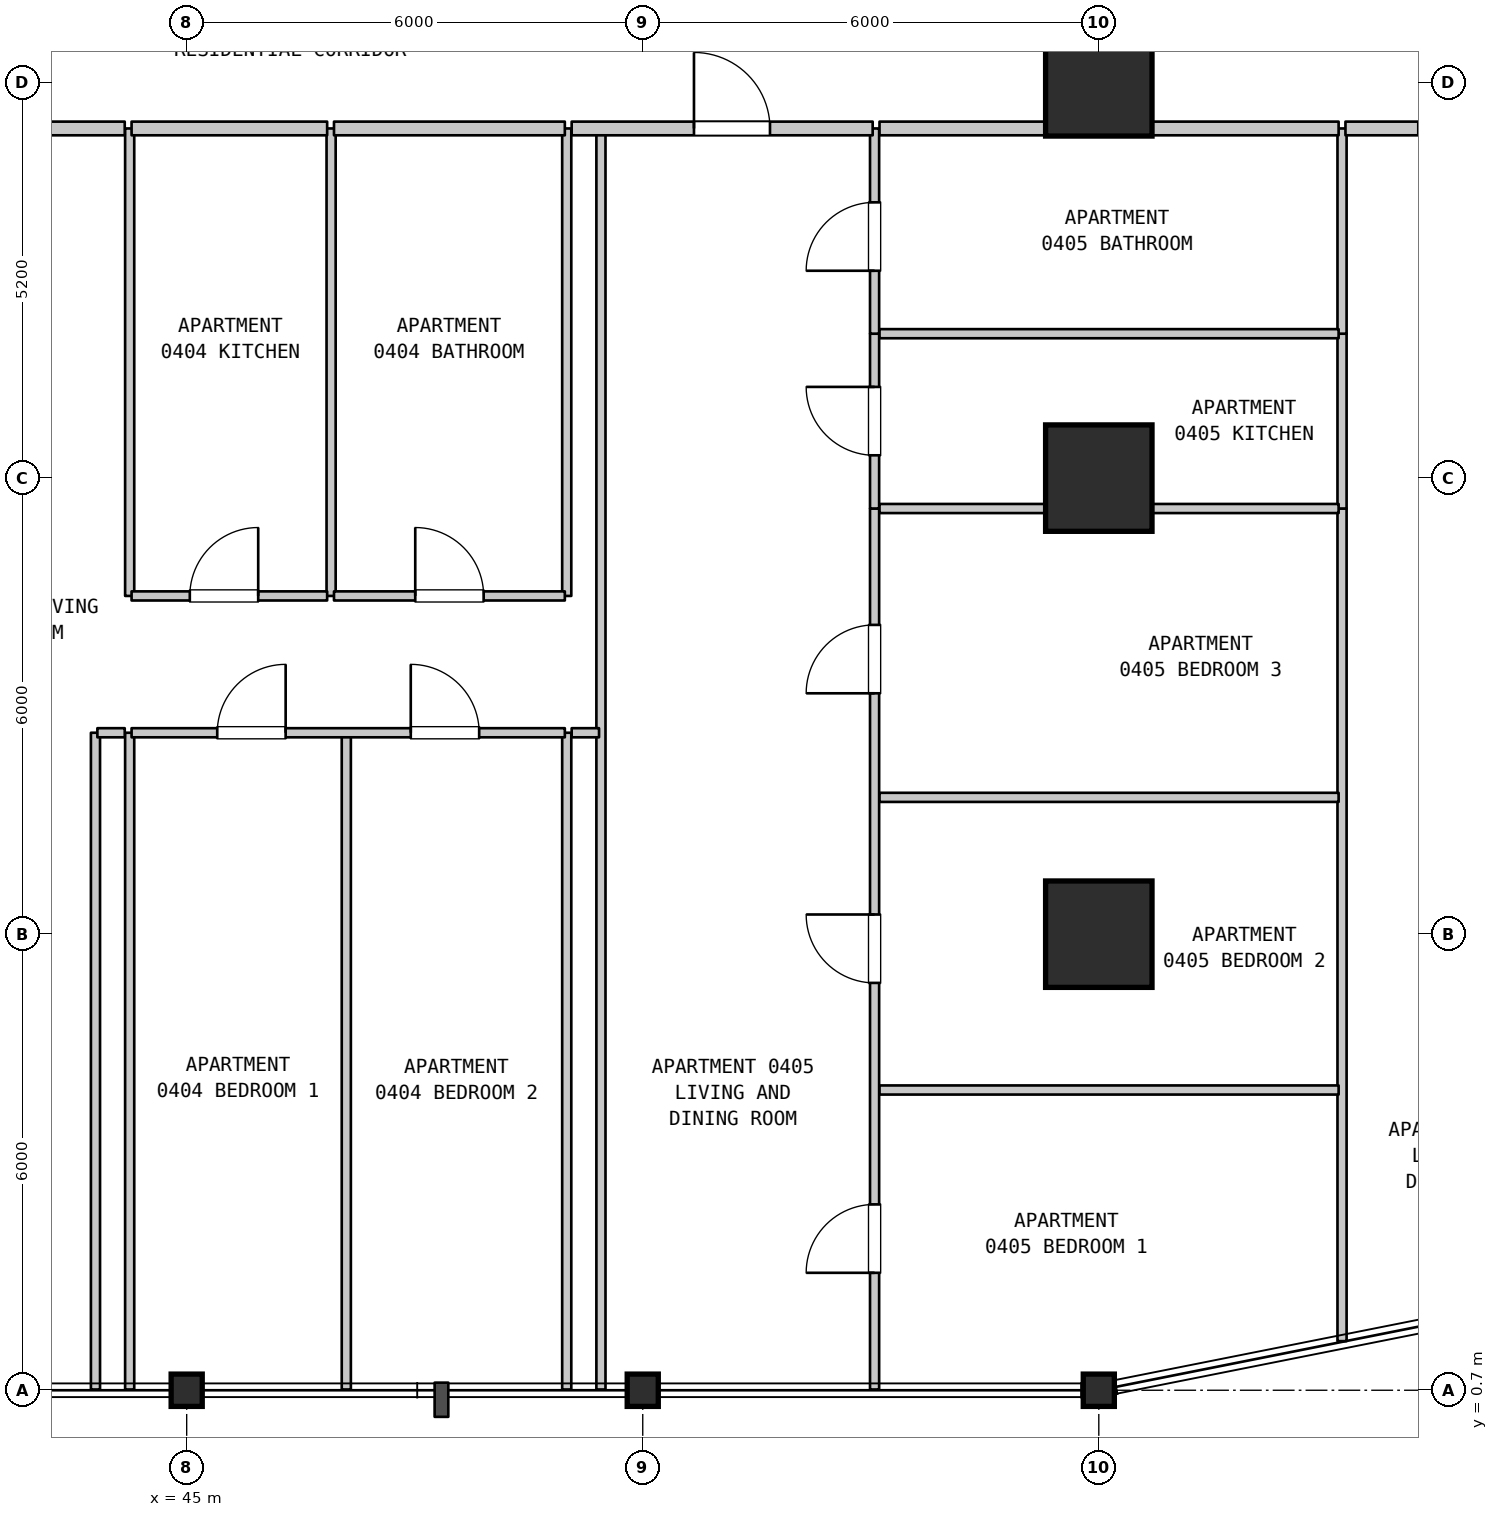
"""IFC4 building model, lengths in metres.
Left out: names, types, materials, properties, quantities, classifications, styles, units other than length and angle.
Written with IfcOpenShell. Run it as: python <this file> out.ifc"""

import sys

from ifc_helpers import new_model, si_unit, direction, frame, frame_2d, origin, origin_2d, place, context, subcontext, project, spatial, rectangle, i_section, extrude, element, fill, save


model = new_model("IFC4")
c1 = context("Model", 3, precision=1e-05, world=origin(), true_north=direction((0.0, 1.0)))
c2 = subcontext(c1, "Body", "Model", "MODEL_VIEW")
j1 = project(units=[si_unit("LENGTHUNIT", "METRE"), si_unit("PLANEANGLEUNIT", "RADIAN")], contexts=[c1])
p1 = place(None, origin())
s1 = spatial("IfcSite", under=j1, at=p1, CompositionType="ELEMENT")
p2 = place(p1, origin())
s2 = spatial("IfcBuilding", under=s1, at=p2, CompositionType="ELEMENT")
p3 = place(p2, frame((0.0, 0.0, 24.0)))
s3 = spatial("IfcBuildingStorey", under=s2, at=p3, CompositionType="ELEMENT", Elevation=24.0)
for number, where, z_axis, x_axis in (
    (1, (45.0, 0.7, 0.0), (0.0, 0.0, 1.0), (1.0, 0.0, 0.0)),
    (2, (51.0, 0.7, 0.0), (0.0, 0.0, 1.0), (1.0, 0.0, 0.0)),
    (3, (57.0, 0.7, 0.0), (0.0, 0.0, 1.0), (1.0, 0.0, 0.0)),
):
    element("IfcColumn", number, at=place(p3, frame(where, z_axis=z_axis, x_axis=x_axis)), inside=s3, PredefinedType="COLUMN", context=c2, shape_type="SweptSolid", body=[
        extrude(i_section(OverallWidth=0.409, OverallDepth=0.425, WebThickness=0.032, FlangeThickness=0.052, FilletRadius=0.015, at=origin_2d()), origin(), (0.0, 0.0, 1.0), 3.7),
    ])
for number, where, z_axis, x_axis in (
    (4, (57.0, 6.7, 0.0), (0.0, 0.0, 1.0), (1.0, 0.0, 0.0)),
    (5, (57.0, 12.7, 0.0), (0.0, 0.0, 1.0), (1.0, 0.0, 0.0)),
    (6, (57.0, 17.9, 0.0), (0.0, 0.0, 1.0), (1.0, 0.0, 0.0)),
):
    element("IfcColumn", number, at=place(p3, frame(where, z_axis=z_axis, x_axis=x_axis)), inside=s3, PredefinedType="COLUMN", context=c2, shape_type="SweptSolid", body=[
        extrude(rectangle(XDim=1.4, YDim=1.4, at=origin_2d()), origin(), (0.0, 0.0, 1.0), 3.7),
    ])
for number, where, z_axis, x_axis in (
    (7, (43.8, 0.71, 0.0), (0.0, 0.0, 1.0), (0.0, 1.0, 0.0)),
    (8, (44.25, 0.71, 0.0), (0.0, 0.0, 1.0), (0.0, 1.0, 0.0)),
):
    element("IfcWall", number, at=place(p3, frame(where, z_axis=z_axis, x_axis=x_axis)), inside=s3, PredefinedType="PARTITIONING", context=c2, shape_type="SweptSolid", body=[
        extrude(rectangle(XDim=8.64, YDim=0.12, at=frame_2d((4.32, 0.0))), origin(), (0.0, 0.0, 1.0), 3.385),
    ])
for number, where, z_axis, x_axis in (
    (9, (44.25, 11.15, 0.0), (0.0, 0.0, 1.0), (0.0, 1.0, 0.0)),
    (10, (46.9, 11.15, 0.0), (0.0, 0.0, 1.0), (0.0, 1.0, 0.0)),
):
    element("IfcWall", number, at=place(p3, frame(where, z_axis=z_axis, x_axis=x_axis)), inside=s3, PredefinedType="PARTITIONING", context=c2, shape_type="SweptSolid", body=[
        extrude(rectangle(XDim=6.15, YDim=0.12, at=frame_2d((3.075, 0.0))), origin(), (0.0, 0.0, 1.0), 3.385),
    ])
for number, where, z_axis, x_axis in (
    (11, (47.1, 0.71, 0.0), (0.0, 0.0, 1.0), (0.0, 1.0, 0.0)),
    (12, (50.0, 0.71, 0.0), (0.0, 0.0, 1.0), (0.0, 1.0, 0.0)),
):
    element("IfcWall", number, at=place(p3, frame(where, z_axis=z_axis, x_axis=x_axis)), inside=s3, PredefinedType="PARTITIONING", context=c2, shape_type="SweptSolid", body=[
        extrude(rectangle(XDim=8.64, YDim=0.12, at=frame_2d((4.32, 0.0))), origin(), (0.0, 0.0, 1.0), 3.385),
    ])
p4 = place(p3, frame((50.0, 11.15, 0.0), z_axis=(0.0, 0.0, 1.0), x_axis=(0.0, 1.0, 0.0)))
e13 = element("IfcWall", 13, at=p4, inside=s3, PredefinedType="PARTITIONING", context=c2, shape_type="SweptSolid", body=[
    extrude(rectangle(XDim=6.15, YDim=0.12, at=frame_2d((3.075, 0.0))), origin(), (0.0, 0.0, 1.0), 3.385),
])
p5 = place(p3, frame((50.45, 0.71, 0.0), z_axis=(0.0, 0.0, 1.0), x_axis=(0.0, 1.0, 0.0)))
e14 = element("IfcWall", 14, at=p5, inside=s3, PredefinedType="PARTITIONING", context=c2, shape_type="SweptSolid", body=[
    extrude(rectangle(XDim=16.59, YDim=0.12, at=frame_2d((8.295, 0.0))), origin(), (0.0, 0.0, 1.0), 3.385),
])
p6 = place(p3, frame((54.05, 0.71, 0.0), z_axis=(0.0, 0.0, 1.0), x_axis=(0.0, 1.0, 0.0)))
e15 = element("IfcWall", 15, at=p6, inside=s3, PredefinedType="PARTITIONING", context=c2, shape_type="SweptSolid", body=[
    extrude(rectangle(XDim=11.59, YDim=0.12, at=frame_2d((5.795, 0.0))), origin(), (0.0, 0.0, 1.0), 3.385),
])
p7 = place(p6, frame((1.535, 0.0, 0.0)))
e16 = element("IfcOpeningElement", 16, at=p7, cuts=e15, PredefinedType="OPENING", context=c2, shape_type="SweptSolid", body=[
    extrude(rectangle(XDim=0.9, YDim=2.15, at=frame_2d((0.45, 1.075))), frame((0.0, 0.07, 0.0), z_axis=(0.0, -1.0, 0.0), x_axis=(1.0, 0.0, 0.0)), (0.0, 0.0, 1.0), 0.14),
])
p8 = place(p6, frame((5.349, 0.0, 0.0)))
e17 = element("IfcOpeningElement", 17, at=p8, cuts=e15, PredefinedType="OPENING", context=c2, shape_type="SweptSolid", body=[
    extrude(rectangle(XDim=0.9, YDim=2.15, at=frame_2d((0.45, 1.075))), frame((0.0, 0.07, 0.0), z_axis=(0.0, -1.0, 0.0), x_axis=(1.0, 0.0, 0.0)), (0.0, 0.0, 1.0), 0.14),
])
p9 = place(p6, frame((9.159, 0.0, 0.0)))
e18 = element("IfcOpeningElement", 18, at=p9, cuts=e15, PredefinedType="OPENING", context=c2, shape_type="SweptSolid", body=[
    extrude(rectangle(XDim=0.9, YDim=2.15, at=frame_2d((0.45, 1.075))), frame((0.0, 0.07, 0.0), z_axis=(0.0, -1.0, 0.0), x_axis=(1.0, 0.0, 0.0)), (0.0, 0.0, 1.0), 0.14),
])
p10 = place(p3, frame((54.05, 12.3, 0.0), z_axis=(0.0, 0.0, 1.0), x_axis=(0.0, 1.0, 0.0)))
e19 = element("IfcWall", 19, at=p10, inside=s3, PredefinedType="PARTITIONING", context=c2, shape_type="SweptSolid", body=[
    extrude(rectangle(XDim=2.3, YDim=0.12, at=frame_2d((1.15, 0.0))), origin(), (0.0, 0.0, 1.0), 3.385),
])
p11 = place(p10, frame((0.7, 0.0, 0.0)))
e20 = element("IfcOpeningElement", 20, at=p11, cuts=e19, PredefinedType="OPENING", context=c2, shape_type="SweptSolid", body=[
    extrude(rectangle(XDim=0.9, YDim=2.15, at=frame_2d((0.45, 1.075))), frame((0.0, 0.07, 0.0), z_axis=(0.0, -1.0, 0.0), x_axis=(1.0, 0.0, 0.0)), (0.0, 0.0, 1.0), 0.14),
])
p12 = place(p3, frame((54.05, 14.6, 0.0), z_axis=(0.0, 0.0, 1.0), x_axis=(0.0, 1.0, 0.0)))
e21 = element("IfcWall", 21, at=p12, inside=s3, PredefinedType="PARTITIONING", context=c2, shape_type="SweptSolid", body=[
    extrude(rectangle(XDim=2.7, YDim=0.12, at=frame_2d((1.35, 0.0))), origin(), (0.0, 0.0, 1.0), 3.385),
])
p13 = place(p12, frame((0.828, 0.0, 0.0)))
e22 = element("IfcOpeningElement", 22, at=p13, cuts=e21, PredefinedType="OPENING", context=c2, shape_type="SweptSolid", body=[
    extrude(rectangle(XDim=0.9, YDim=2.1, at=frame_2d((0.45, 1.05))), frame((0.0, 0.07, 0.0), z_axis=(0.0, -1.0, 0.0), x_axis=(1.0, 0.0, 0.0)), (0.0, 0.0, 1.0), 0.14),
])
p14 = place(p3, frame((60.2, 1.346, 0.0), z_axis=(0.0, 0.0, 1.0), x_axis=(0.0, 1.0, 0.0)))
e23 = element("IfcWall", 23, at=p14, inside=s3, PredefinedType="PARTITIONING", context=c2, shape_type="SweptSolid", body=[
    extrude(rectangle(XDim=10.954, YDim=0.12, at=frame_2d((5.477, 0.0))), origin(), (0.0, 0.0, 1.0), 3.385),
])
p15 = place(p3, frame((60.2, 12.3, 0.0), z_axis=(0.0, 0.0, 1.0), x_axis=(0.0, 1.0, 0.0)))
e24 = element("IfcWall", 24, at=p15, inside=s3, PredefinedType="PARTITIONING", context=c2, shape_type="SweptSolid", body=[
    extrude(rectangle(XDim=2.3, YDim=0.12, at=frame_2d((1.15, 0.0))), origin(), (0.0, 0.0, 1.0), 3.385),
])
p16 = place(p3, frame((60.2, 14.6, 0.0), z_axis=(0.0, 0.0, 1.0), x_axis=(0.0, 1.0, 0.0)))
e25 = element("IfcWall", 25, at=p16, inside=s3, PredefinedType="PARTITIONING", context=c2, shape_type="SweptSolid", body=[
    extrude(rectangle(XDim=2.7, YDim=0.12, at=frame_2d((1.35, 0.0))), origin(), (0.0, 0.0, 1.0), 3.385),
])
for number, where, z_axis, x_axis in (
    (26, (54.115, 4.65, 0.0), (0.0, 0.0, 1.0), (1.0, 0.0, 0.0)),
    (27, (54.115, 8.5, 0.0), (0.0, 0.0, 1.0), (1.0, 0.0, 0.0)),
):
    element("IfcWall", number, at=place(p3, frame(where, z_axis=z_axis, x_axis=x_axis)), inside=s3, PredefinedType="PARTITIONING", context=c2, shape_type="SweptSolid", body=[
        extrude(rectangle(XDim=6.04, YDim=0.12, at=frame_2d((3.02, 0.0))), origin(), (0.0, 0.0, 1.0), 3.385),
    ])
p17 = place(p3, frame((43.825, 9.35, 0.0), z_axis=(0.0, 0.0, 1.0), x_axis=(1.0, 0.0, 0.0)))
e28 = element("IfcWall", 28, at=p17, inside=s3, PredefinedType="PARTITIONING", context=c2, shape_type="SweptSolid", body=[
    extrude(rectangle(XDim=0.36, YDim=0.12, at=frame_2d((0.18, 0.0))), origin(), (0.0, 0.0, 1.0), 3.385),
])
p18 = place(p3, frame((44.275, 9.35, 0.0), z_axis=(0.0, 0.0, 1.0), x_axis=(1.0, 0.0, 0.0)))
e29 = element("IfcWall", 29, at=p18, inside=s3, PredefinedType="PARTITIONING", context=c2, shape_type="SweptSolid", body=[
    extrude(rectangle(XDim=5.7, YDim=0.12, at=frame_2d((2.85, 0.0))), origin(), (0.0, 0.0, 1.0), 3.385),
])
p19 = place(p18, frame((1.127, 0.0, 0.0)))
e30 = element("IfcOpeningElement", 30, at=p19, cuts=e29, PredefinedType="OPENING", context=c2, shape_type="SweptSolid", body=[
    extrude(rectangle(XDim=0.9, YDim=2.15, at=frame_2d((0.45, 1.075))), frame((0.0, 0.07, 0.0), z_axis=(0.0, -1.0, 0.0), x_axis=(1.0, 0.0, 0.0)), (0.0, 0.0, 1.0), 0.14),
])
p20 = place(p18, frame((3.673, 0.0, 0.0)))
e31 = element("IfcOpeningElement", 31, at=p20, cuts=e29, PredefinedType="OPENING", context=c2, shape_type="SweptSolid", body=[
    extrude(rectangle(XDim=0.9, YDim=2.15, at=frame_2d((0.45, 1.075))), frame((0.0, 0.07, 0.0), z_axis=(0.0, -1.0, 0.0), x_axis=(1.0, 0.0, 0.0)), (0.0, 0.0, 1.0), 0.14),
])
p21 = place(p3, frame((50.065, 9.35, 0.0), z_axis=(0.0, 0.0, 1.0), x_axis=(1.0, 0.0, 0.0)))
e32 = element("IfcWall", 32, at=p21, inside=s3, PredefinedType="PARTITIONING", context=c2, shape_type="SweptSolid", body=[
    extrude(rectangle(XDim=0.36, YDim=0.12, at=frame_2d((0.18, 0.0))), origin(), (0.0, 0.0, 1.0), 3.385),
])
p22 = place(p3, frame((44.275, 11.15, 0.0), z_axis=(0.0, 0.0, 1.0), x_axis=(1.0, 0.0, 0.0)))
e33 = element("IfcWall", 33, at=p22, inside=s3, PredefinedType="PARTITIONING", context=c2, shape_type="SweptSolid", body=[
    extrude(rectangle(XDim=2.573, YDim=0.12, at=frame_2d((1.287, 0.0))), origin(), (0.0, 0.0, 1.0), 3.385),
])
p23 = place(p22, frame((0.766, 0.0, 0.0)))
e34 = element("IfcOpeningElement", 34, at=p23, cuts=e33, PredefinedType="OPENING", context=c2, shape_type="SweptSolid", body=[
    extrude(rectangle(XDim=0.9, YDim=2.15, at=frame_2d((0.45, 1.075))), frame((0.0, 0.07, 0.0), z_axis=(0.0, -1.0, 0.0), x_axis=(1.0, 0.0, 0.0)), (0.0, 0.0, 1.0), 0.14),
])
p24 = place(p3, frame((46.938, 11.15, 0.0), z_axis=(0.0, 0.0, 1.0), x_axis=(1.0, 0.0, 0.0)))
e35 = element("IfcWall", 35, at=p24, inside=s3, PredefinedType="PARTITIONING", context=c2, shape_type="SweptSolid", body=[
    extrude(rectangle(XDim=3.037, YDim=0.12, at=frame_2d((1.519, 0.0))), origin(), (0.0, 0.0, 1.0), 3.385),
])
p25 = place(p24, frame((1.069, 0.0, 0.0)))
e36 = element("IfcOpeningElement", 36, at=p25, cuts=e35, PredefinedType="OPENING", context=c2, shape_type="SweptSolid", body=[
    extrude(rectangle(XDim=0.9, YDim=2.1, at=frame_2d((0.45, 1.05))), frame((0.0, 0.07, 0.0), z_axis=(0.0, -1.0, 0.0), x_axis=(1.0, 0.0, 0.0)), (0.0, 0.0, 1.0), 0.14),
])
for number, where, z_axis, x_axis in (
    (37, (54.115, 12.3, 0.0), (0.0, 0.0, 1.0), (1.0, 0.0, 0.0)),
    (38, (54.115, 14.6, 0.0), (0.0, 0.0, 1.0), (1.0, 0.0, 0.0)),
):
    element("IfcWall", number, at=place(p3, frame(where, z_axis=z_axis, x_axis=x_axis)), inside=s3, PredefinedType="PARTITIONING", context=c2, shape_type="SweptSolid", body=[
        extrude(rectangle(XDim=6.04, YDim=0.12, at=frame_2d((3.02, 0.0))), origin(), (0.0, 0.0, 1.0), 3.385),
    ])
p26 = place(p3, frame((39.775, 17.3, 0.0), z_axis=(0.0, 0.0, 1.0), x_axis=(1.0, 0.0, 0.0)))
e39 = element("IfcWall", 39, at=p26, inside=s3, PredefinedType="STANDARD", context=c2, shape_type="SweptSolid", body=[
    extrude(rectangle(XDim=4.41, YDim=0.18, at=frame_2d((2.205, 0.0))), origin(), (0.0, 0.0, 1.0), 3.385),
])
p27 = place(p26, frame((1.905, 0.0, 0.0)))
e40 = element("IfcOpeningElement", 40, at=p27, cuts=e39, PredefinedType="OPENING", context=c2, shape_type="SweptSolid", body=[
    extrude(rectangle(XDim=1.0, YDim=2.15, at=frame_2d((0.5, 1.075))), frame((0.0, 0.1, 0.0), z_axis=(0.0, -1.0, 0.0), x_axis=(1.0, 0.0, 0.0)), (0.0, 0.0, 1.0), 0.2),
])
p28 = place(p3, frame((44.275, 17.3, 0.0), z_axis=(0.0, 0.0, 1.0), x_axis=(1.0, 0.0, 0.0)))
e41 = element("IfcWall", 41, at=p28, inside=s3, PredefinedType="STANDARD", context=c2, shape_type="SweptSolid", body=[
    extrude(rectangle(XDim=2.573, YDim=0.18, at=frame_2d((1.287, 0.0))), origin(), (0.0, 0.0, 1.0), 3.385),
])
p29 = place(p3, frame((46.938, 17.3, 0.0), z_axis=(0.0, 0.0, 1.0), x_axis=(1.0, 0.0, 0.0)))
e42 = element("IfcWall", 42, at=p29, inside=s3, PredefinedType="STANDARD", context=c2, shape_type="SweptSolid", body=[
    extrude(rectangle(XDim=3.037, YDim=0.18, at=frame_2d((1.519, 0.0))), origin(), (0.0, 0.0, 1.0), 3.385),
])
p30 = place(p3, frame((50.065, 17.3, 0.0), z_axis=(0.0, 0.0, 1.0), x_axis=(1.0, 0.0, 0.0)))
e43 = element("IfcWall", 43, at=p30, inside=s3, PredefinedType="STANDARD", context=c2, shape_type="SweptSolid", body=[
    extrude(rectangle(XDim=3.96, YDim=0.18, at=frame_2d((1.98, 0.0))), origin(), (0.0, 0.0, 1.0), 3.385),
])
p31 = place(p30, frame((1.609, 0.0, 0.0)))
e44 = element("IfcOpeningElement", 44, at=p31, cuts=e43, PredefinedType="OPENING", context=c2, shape_type="SweptSolid", body=[
    extrude(rectangle(XDim=1.0, YDim=2.15, at=frame_2d((0.5, 1.075))), frame((0.0, 0.1, 0.0), z_axis=(0.0, -1.0, 0.0), x_axis=(1.0, 0.0, 0.0)), (0.0, 0.0, 1.0), 0.2),
])
p32 = place(p3, frame((54.115, 17.3, 0.0), z_axis=(0.0, 0.0, 1.0), x_axis=(1.0, 0.0, 0.0)))
e45 = element("IfcWall", 45, at=p32, inside=s3, PredefinedType="STANDARD", context=c2, shape_type="SweptSolid", body=[
    extrude(rectangle(XDim=6.04, YDim=0.18, at=frame_2d((3.02, 0.0))), origin(), (0.0, 0.0, 1.0), 3.385),
])
p33 = place(p3, frame((60.245, 17.3, 0.0), z_axis=(0.0, 0.0, 1.0), x_axis=(1.0, 0.0, 0.0)))
e46 = element("IfcWall", 46, at=p33, inside=s3, PredefinedType="STANDARD", context=c2, shape_type="SweptSolid", body=[
    extrude(rectangle(XDim=3.51, YDim=0.18, at=frame_2d((1.755, 0.0))), origin(), (0.0, 0.0, 1.0), 3.385),
])
p34 = place(p33, frame((0.958, 0.0, 0.0)))
e47 = element("IfcOpeningElement", 47, at=p34, cuts=e46, PredefinedType="OPENING", context=c2, shape_type="SweptSolid", body=[
    extrude(rectangle(XDim=1.0, YDim=2.15, at=frame_2d((0.5, 1.075))), frame((0.0, 0.1, 0.0), z_axis=(0.0, -1.0, 0.0), x_axis=(1.0, 0.0, 0.0)), (0.0, 0.0, 1.0), 0.2),
])
p35 = place(p7, origin())
e48 = element("IfcDoor", 48, at=p35, inside=s3, OperationType="SINGLE_SWING_LEFT", PredefinedType="DOOR", context=c2, shape_type="SweptSolid", body=[
    extrude(rectangle(XDim=0.9, YDim=2.15, at=frame_2d((0.45, 1.075))), frame((0.0, 0.025, 0.0), z_axis=(0.0, -1.0, 0.0), x_axis=(1.0, 0.0, 0.0)), (0.0, 0.0, 1.0), 0.05),
])
fill(e16, e48)
p36 = place(p8, origin())
e49 = element("IfcDoor", 49, at=p36, inside=s3, OperationType="SINGLE_SWING_RIGHT", PredefinedType="DOOR", context=c2, shape_type="SweptSolid", body=[
    extrude(rectangle(XDim=0.9, YDim=2.15, at=frame_2d((0.45, 1.075))), frame((0.0, 0.025, 0.0), z_axis=(0.0, -1.0, 0.0), x_axis=(1.0, 0.0, 0.0)), (0.0, 0.0, 1.0), 0.05),
])
fill(e17, e49)
p37 = place(p9, origin())
e50 = element("IfcDoor", 50, at=p37, inside=s3, OperationType="SINGLE_SWING_LEFT", PredefinedType="DOOR", context=c2, shape_type="SweptSolid", body=[
    extrude(rectangle(XDim=0.9, YDim=2.15, at=frame_2d((0.45, 1.075))), frame((0.0, 0.025, 0.0), z_axis=(0.0, -1.0, 0.0), x_axis=(1.0, 0.0, 0.0)), (0.0, 0.0, 1.0), 0.05),
])
fill(e18, e50)
p38 = place(p11, origin())
e51 = element("IfcDoor", 51, at=p38, inside=s3, OperationType="SINGLE_SWING_RIGHT", PredefinedType="DOOR", context=c2, shape_type="SweptSolid", body=[
    extrude(rectangle(XDim=0.9, YDim=2.15, at=frame_2d((0.45, 1.075))), frame((0.0, 0.025, 0.0), z_axis=(0.0, -1.0, 0.0), x_axis=(1.0, 0.0, 0.0)), (0.0, 0.0, 1.0), 0.05),
])
fill(e20, e51)
p39 = place(p13, origin())
e52 = element("IfcDoor", 52, at=p39, inside=s3, OperationType="SINGLE_SWING_LEFT", PredefinedType="DOOR", context=c2, shape_type="SweptSolid", body=[
    extrude(rectangle(XDim=0.9, YDim=2.1, at=frame_2d((0.45, 1.05))), frame((0.0, 0.025, 0.0), z_axis=(0.0, -1.0, 0.0), x_axis=(1.0, 0.0, 0.0)), (0.0, 0.0, 1.0), 0.05),
])
fill(e22, e52)
p40 = place(p19, origin())
e53 = element("IfcDoor", 53, at=p40, inside=s3, OperationType="SINGLE_SWING_RIGHT", PredefinedType="DOOR", context=c2, shape_type="SweptSolid", body=[
    extrude(rectangle(XDim=0.9, YDim=2.15, at=frame_2d((0.45, 1.075))), frame((0.0, 0.025, 0.0), z_axis=(0.0, -1.0, 0.0), x_axis=(1.0, 0.0, 0.0)), (0.0, 0.0, 1.0), 0.05),
])
fill(e30, e53)
p41 = place(p20, origin())
e54 = element("IfcDoor", 54, at=p41, inside=s3, OperationType="SINGLE_SWING_LEFT", PredefinedType="DOOR", context=c2, shape_type="SweptSolid", body=[
    extrude(rectangle(XDim=0.9, YDim=2.15, at=frame_2d((0.45, 1.075))), frame((0.0, 0.025, 0.0), z_axis=(0.0, -1.0, 0.0), x_axis=(1.0, 0.0, 0.0)), (0.0, 0.0, 1.0), 0.05),
])
fill(e31, e54)
p42 = place(p23, origin())
e55 = element("IfcDoor", 55, at=p42, inside=s3, OperationType="SINGLE_SWING_RIGHT", PredefinedType="DOOR", context=c2, shape_type="SweptSolid", body=[
    extrude(rectangle(XDim=0.9, YDim=2.15, at=frame_2d((0.45, 1.075))), frame((0.0, 0.025, 0.0), z_axis=(0.0, -1.0, 0.0), x_axis=(1.0, 0.0, 0.0)), (0.0, 0.0, 1.0), 0.05),
])
fill(e34, e55)
p43 = place(p25, origin())
e56 = element("IfcDoor", 56, at=p43, inside=s3, OperationType="SINGLE_SWING_LEFT", PredefinedType="DOOR", context=c2, shape_type="SweptSolid", body=[
    extrude(rectangle(XDim=0.9, YDim=2.1, at=frame_2d((0.45, 1.05))), frame((0.0, 0.025, 0.0), z_axis=(0.0, -1.0, 0.0), x_axis=(1.0, 0.0, 0.0)), (0.0, 0.0, 1.0), 0.05),
])
fill(e36, e56)
p44 = place(p31, origin())
e57 = element("IfcDoor", 57, at=p44, inside=s3, OperationType="SINGLE_SWING_LEFT", PredefinedType="DOOR", context=c2, shape_type="SweptSolid", body=[
    extrude(rectangle(XDim=1.0, YDim=2.15, at=frame_2d((0.5, 1.075))), frame((0.0, 0.025, 0.0), z_axis=(0.0, -1.0, 0.0), x_axis=(1.0, 0.0, 0.0)), (0.0, 0.0, 1.0), 0.05),
])
fill(e44, e57)
save(model, sys.argv[1])
